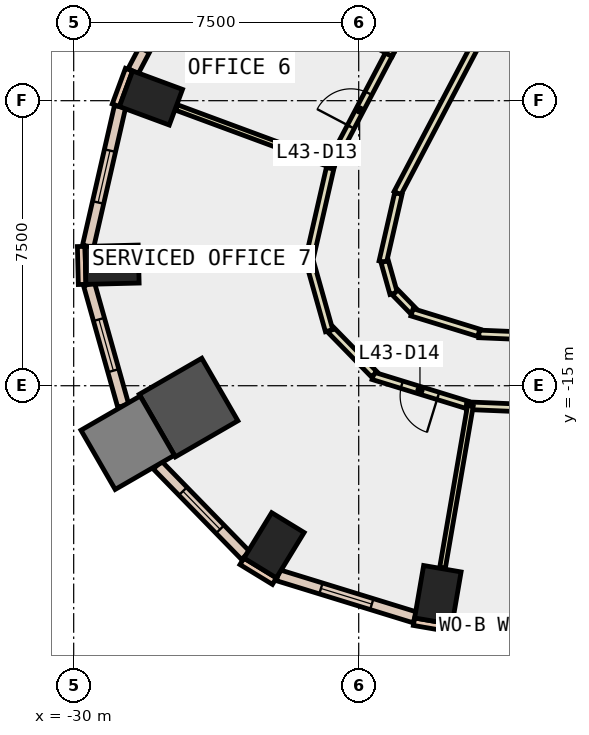
"""IFC4 building model, lengths in metres.
Left out: names, types, materials, properties, quantities, classifications, styles, units other than length and angle.
Written with IfcOpenShell. Run it as: python <this file> out.ifc"""

import sys

from ifc_helpers import new_model, si_unit, direction, frame, frame_2d, origin, origin_2d, place, context, subcontext, project, spatial, rectangle, extrude, element, fill, save


model = new_model("IFC4")
c1 = context("Model", 3, precision=1e-05, world=origin(), true_north=direction((0.0, 1.0)))
c2 = subcontext(c1, "Body", "Model", "MODEL_VIEW")
j1 = project(units=[si_unit("LENGTHUNIT", "METRE"), si_unit("PLANEANGLEUNIT", "RADIAN")], contexts=[c1])
p1 = place(None, origin())
s1 = spatial("IfcSite", under=j1, at=p1, CompositionType="ELEMENT")
p2 = place(p1, origin())
s2 = spatial("IfcBuilding", under=s1, at=p2, CompositionType="ELEMENT")
p3 = place(p2, frame((0.0, 0.0, 194.0)))
s3 = spatial("IfcBuildingStorey", under=s2, at=p3, CompositionType="ELEMENT", Elevation=194.0)
for number, where, z_axis, x_axis in (
    (1, (-20.417, -20.505, -0.4), (0.0, 0.0, 1.0), (-0.986, 0.169, 0.0)),
    (2, (-27.967, -7.429, -0.4), (0.0, 0.0, 1.0), (0.347, 0.938, 0.0)),
    (3, (-28.99, -11.816, -0.4), (0.0, 0.0, 1.0), (-0.025, 1.0, 0.0)),
):
    element("IfcColumn", number, at=place(p3, frame(where, z_axis=z_axis, x_axis=x_axis)), inside=s3, PredefinedType="COLUMN", context=c2, shape_type="SweptSolid", body=[
        extrude(rectangle(XDim=1.0, YDim=1.4, at=origin_2d()), origin(), (0.0, 0.0, 1.0), 4.2),
    ])
p4 = place(p3, frame((-26.977, -15.575, -0.4), z_axis=(0.0, 0.0, 1.0), x_axis=(0.866025403784, 0.5, 0.0)))
e4 = element("IfcColumn", 4, at=p4, inside=s3, PredefinedType="COLUMN", context=c2, shape_type="SweptSolid", body=[
    extrude(rectangle(XDim=1.9, YDim=1.9, at=origin_2d()), origin(), (0.0, 0.0, 1.0), 4.2),
])
p5 = place(p3, frame((-24.728, -19.199, -0.4), z_axis=(0.0, 0.0, 1.0), x_axis=(-0.853423465127, 0.521218178089, 0.0)))
e5 = element("IfcColumn", 5, at=p5, inside=s3, PredefinedType="COLUMN", context=c2, shape_type="SweptSolid", body=[
    extrude(rectangle(XDim=1.0, YDim=1.4, at=origin_2d()), origin(), (0.0, 0.0, 1.0), 4.2),
])
p6 = place(p3, frame((-28.579, -16.5, -0.4), z_axis=(0.0, 0.0, 1.0), x_axis=(0.866025403784, 0.5, 0.0)))
e6 = element("IfcColumn", 6, at=p6, inside=s3, PredefinedType="COLUMN", context=c2, shape_type="SweptSolid", body=[
    extrude(rectangle(XDim=1.8, YDim=1.8, at=origin_2d()), origin(), (0.0, 0.0, 1.0), 4.2),
])
for number, where, z_axis, x_axis in (
    (7, (-28.544, -6.683, 0.0), (0.0, 0.0, 1.0), (-0.347, -0.938, 0.0)),
    (8, (-21.045, -21.209, 0.0), (0.0, 0.0, 1.0), (0.986, -0.169, 0.0)),
):
    element("IfcWall", number, at=place(p3, frame(where, z_axis=z_axis, x_axis=x_axis)), inside=s3, PredefinedType="STANDARD", context=c2, shape_type="SweptSolid", body=[
        extrude(rectangle(XDim=1.0, YDim=0.2, at=frame_2d((0.5, 0.0))), origin(), (0.0, 0.0, 1.0), 3.8),
    ])
p7 = place(p3, frame((-29.802, -11.336, 0.0), z_axis=(0.0, 0.0, 1.0), x_axis=(0.023942303888, -0.999713341956, 0.0)))
e9 = element("IfcWall", 9, at=p7, inside=s3, PredefinedType="STANDARD", context=c2, shape_type="SweptSolid", body=[
    extrude(rectangle(XDim=0.999, YDim=0.2, at=frame_2d((0.5, 0.0))), origin(), (0.0, 0.0, 1.0), 3.8),
])
p8 = place(p3, frame((-25.572, -19.621, 0.0), z_axis=(0.0, 0.0, 1.0), x_axis=(0.853679739553, -0.520798331677, 0.0)))
e10 = element("IfcWall", 10, at=p8, inside=s3, PredefinedType="STANDARD", context=c2, shape_type="SweptSolid", body=[
    extrude(rectangle(XDim=1.0, YDim=0.2, at=frame_2d((0.5, 0.0))), origin(), (0.0, 0.0, 1.0), 3.8),
])
p9 = place(p3, frame((-20.041, -21.264, 0.0), z_axis=(0.0, 0.0, 1.0), x_axis=(0.999127941775, -0.041753514387, 0.0)))
e11 = element("IfcWall", 11, at=p9, inside=s3, PredefinedType="STANDARD", context=c2, shape_type="SweptSolid", body=[
    extrude(rectangle(XDim=5.368, YDim=0.3, at=frame_2d((2.684, 0.0))), origin(), (0.0, 0.0, 1.0), 3.8),
])
p10 = place(p9, frame((0.642, 0.0, 0.9)))
e12 = element("IfcOpeningElement", 12, at=p10, cuts=e11, PredefinedType="OPENING", context=c2, shape_type="SweptSolid", body=[
    extrude(rectangle(XDim=1.4, YDim=2.6, at=frame_2d((0.7, 1.3))), frame((0.0, 0.16, 0.0), z_axis=(0.0, -1.0, 0.0), x_axis=(1.0, 0.0, 0.0)), (0.0, 0.0, 1.0), 0.32),
])
p11 = place(p9, frame((3.326, 0.0, 0.9)))
e13 = element("IfcOpeningElement", 13, at=p11, cuts=e11, PredefinedType="OPENING", context=c2, shape_type="SweptSolid", body=[
    extrude(rectangle(XDim=1.4, YDim=2.6, at=frame_2d((0.7, 1.3))), frame((0.0, 0.16, 0.0), z_axis=(0.0, -1.0, 0.0), x_axis=(1.0, 0.0, 0.0)), (0.0, 0.0, 1.0), 0.32),
])
p12 = place(p3, frame((-25.08, -0.345, 0.0), z_axis=(0.0, 0.0, 1.0), x_axis=(-0.465478369088, -0.885059256723, 0.0)))
e14 = element("IfcWall", 14, at=p12, inside=s3, PredefinedType="STANDARD", context=c2, shape_type="SweptSolid", body=[
    extrude(rectangle(XDim=7.208, YDim=0.3, at=frame_2d((3.604, 0.0))), origin(), (0.0, 0.0, 1.0), 3.8),
])
p13 = place(p12, frame((0.602, 0.0, 0.9)))
e15 = element("IfcOpeningElement", 15, at=p13, cuts=e14, PredefinedType="OPENING", context=c2, shape_type="SweptSolid", body=[
    extrude(rectangle(XDim=2.4, YDim=2.6, at=frame_2d((1.2, 1.3))), frame((0.0, 0.16, 0.0), z_axis=(0.0, -1.0, 0.0), x_axis=(1.0, 0.0, 0.0)), (0.0, 0.0, 1.0), 0.32),
])
p14 = place(p12, frame((4.206, 0.0, 0.9)))
e16 = element("IfcOpeningElement", 16, at=p14, cuts=e14, PredefinedType="OPENING", context=c2, shape_type="SweptSolid", body=[
    extrude(rectangle(XDim=2.4, YDim=2.6, at=frame_2d((1.2, 1.3))), frame((0.0, 0.16, 0.0), z_axis=(0.0, -1.0, 0.0), x_axis=(1.0, 0.0, 0.0)), (0.0, 0.0, 1.0), 0.32),
])
p15 = place(p3, frame((-28.781, -7.66, 0.0), z_axis=(0.0, 0.0, 1.0), x_axis=(-0.223013094864, -0.974815448954, 0.0)))
e17 = element("IfcWall", 17, at=p15, inside=s3, PredefinedType="STANDARD", context=c2, shape_type="SweptSolid", body=[
    extrude(rectangle(XDim=3.767, YDim=0.3, at=frame_2d((1.884, 0.0))), origin(), (0.0, 0.0, 1.0), 3.8),
])
p16 = place(p15, frame((1.183, 0.0, 0.9)))
e18 = element("IfcOpeningElement", 18, at=p16, cuts=e17, PredefinedType="OPENING", context=c2, shape_type="SweptSolid", body=[
    extrude(rectangle(XDim=1.4, YDim=2.6, at=frame_2d((0.7, 1.3))), frame((0.0, 0.16, 0.0), z_axis=(0.0, -1.0, 0.0), x_axis=(1.0, 0.0, 0.0)), (0.0, 0.0, 1.0), 0.32),
])
p17 = place(p3, frame((-29.596, -12.33, 0.0), z_axis=(0.0, 0.0, 1.0), x_axis=(0.270798765166, -0.962635979374, 0.0)))
e19 = element("IfcWall", 19, at=p17, inside=s3, PredefinedType="STANDARD", context=c2, shape_type="SweptSolid", body=[
    extrude(rectangle(XDim=3.323, YDim=0.3, at=frame_2d((1.662, 0.0))), origin(), (0.0, 0.0, 1.0), 3.8),
])
p18 = place(p17, frame((0.962, 0.0, 0.9)))
e20 = element("IfcOpeningElement", 20, at=p18, cuts=e19, PredefinedType="OPENING", context=c2, shape_type="SweptSolid", body=[
    extrude(rectangle(XDim=1.4, YDim=2.6, at=frame_2d((0.7, 1.3))), frame((0.0, 0.16, 0.0), z_axis=(0.0, -1.0, 0.0), x_axis=(1.0, 0.0, 0.0)), (0.0, 0.0, 1.0), 0.32),
])
p19 = place(p3, frame((-27.797, -17.087, 0.0), z_axis=(0.0, 0.0, 1.0), x_axis=(0.698311919602, -0.71579358962, 0.0)))
e21 = element("IfcWall", 21, at=p19, inside=s3, PredefinedType="STANDARD", context=c2, shape_type="SweptSolid", body=[
    extrude(rectangle(XDim=3.324, YDim=0.3, at=frame_2d((1.662, 0.0))), origin(), (0.0, 0.0, 1.0), 3.8),
])
p20 = place(p19, frame((0.962, 0.0, 0.9)))
e22 = element("IfcOpeningElement", 22, at=p20, cuts=e21, PredefinedType="OPENING", context=c2, shape_type="SweptSolid", body=[
    extrude(rectangle(XDim=1.4, YDim=2.6, at=frame_2d((0.7, 1.3))), frame((0.0, 0.16, 0.0), z_axis=(0.0, -1.0, 0.0), x_axis=(1.0, 0.0, 0.0)), (0.0, 0.0, 1.0), 0.32),
])
p21 = place(p3, frame((-24.624, -19.986, 0.0), z_axis=(0.0, 0.0, 1.0), x_axis=(0.955692086233, -0.29436819854, 0.0)))
e23 = element("IfcWall", 23, at=p21, inside=s3, PredefinedType="STANDARD", context=c2, shape_type="SweptSolid", body=[
    extrude(rectangle(XDim=3.767, YDim=0.3, at=frame_2d((1.884, 0.0))), origin(), (0.0, 0.0, 1.0), 3.8),
])
p22 = place(p21, frame((1.183, 0.0, 0.9)))
e24 = element("IfcOpeningElement", 24, at=p22, cuts=e23, PredefinedType="OPENING", context=c2, shape_type="SweptSolid", body=[
    extrude(rectangle(XDim=1.4, YDim=2.6, at=frame_2d((0.7, 1.3))), frame((0.0, 0.16, 0.0), z_axis=(0.0, -1.0, 0.0), x_axis=(1.0, 0.0, 0.0)), (0.0, 0.0, 1.0), 0.32),
])
p23 = place(p3, frame((-18.112, -3.531, 0.0), z_axis=(0.0, 0.0, 1.0), x_axis=(-0.465461327558, -0.885068219149, 0.0)))
e25 = element("IfcWall", 25, at=p23, inside=s3, PredefinedType="PARTITIONING", context=c2, shape_type="SweptSolid", body=[
    extrude(rectangle(XDim=7.236, YDim=0.2, at=frame_2d((3.618, 0.0))), origin(), (0.0, 0.0, 1.0), 3.8),
])
p24 = place(p3, frame((-21.456, -9.944, 0.0), z_axis=(0.0, 0.0, 1.0), x_axis=(-0.222871656966, -0.974847795567, 0.0)))
e26 = element("IfcWall", 26, at=p24, inside=s3, PredefinedType="PARTITIONING", context=c2, shape_type="SweptSolid", body=[
    extrude(rectangle(XDim=1.839, YDim=0.2, at=frame_2d((0.919, 0.0))), origin(), (0.0, 0.0, 1.0), 3.8),
])
p25 = place(p3, frame((-21.816, -11.735, 0.0), z_axis=(0.0, 0.0, 1.0), x_axis=(0.270192443589, -0.962806337447, 0.0)))
e27 = element("IfcWall", 27, at=p25, inside=s3, PredefinedType="PARTITIONING", context=c2, shape_type="SweptSolid", body=[
    extrude(rectangle(XDim=0.869, YDim=0.2, at=frame_2d((0.435, 0.0))), origin(), (0.0, 0.0, 1.0), 3.8),
])
p26 = place(p3, frame((-21.538, -12.547, 0.0), z_axis=(0.0, 0.0, 1.0), x_axis=(0.697542638825, -0.716543276446, 0.0)))
e28 = element("IfcWall", 28, at=p26, inside=s3, PredefinedType="PARTITIONING", context=c2, shape_type="SweptSolid", body=[
    extrude(rectangle(XDim=0.668, YDim=0.2, at=frame_2d((0.334, 0.0))), origin(), (0.0, 0.0, 1.0), 3.8),
])
p27 = place(p3, frame((-21.097, -13.068, 0.0), z_axis=(0.0, 0.0, 1.0), x_axis=(0.955790442908, -0.294048685161, 0.0)))
e29 = element("IfcWall", 29, at=p27, inside=s3, PredefinedType="PARTITIONING", context=c2, shape_type="SweptSolid", body=[
    extrude(rectangle(XDim=1.846, YDim=0.2, at=frame_2d((0.923, 0.0))), origin(), (0.0, 0.0, 1.0), 3.8),
])
p28 = place(p3, frame((-19.336, -13.637, 0.0), z_axis=(0.0, 0.0, 1.0), x_axis=(0.999130261307, -0.041697972867, 0.0)))
e30 = element("IfcWall", 30, at=p28, inside=s3, PredefinedType="PARTITIONING", context=c2, shape_type="SweptSolid", body=[
    extrude(rectangle(XDim=5.422, YDim=0.2, at=frame_2d((2.711, 0.0))), origin(), (0.0, 0.0, 1.0), 3.8),
])
p29 = place(p3, frame((-23.242, -9.204, 0.0), z_axis=(0.0, 0.0, 1.0), x_axis=(0.465431933571, 0.885083676955, 0.0)))
e31 = element("IfcWall", 31, at=p29, inside=s3, PredefinedType="PARTITIONING", context=c2, shape_type="SweptSolid", body=[
    extrude(rectangle(XDim=3.296, YDim=0.2, at=frame_2d((1.648, 0.0))), origin(), (0.0, 0.0, 1.0), 3.8),
])
p30 = place(p29, frame((1.148, 0.0, 0.0)))
e32 = element("IfcOpeningElement", 32, at=p30, cuts=e31, PredefinedType="OPENING", context=c2, shape_type="SweptSolid", body=[
    extrude(rectangle(XDim=1.0, YDim=2.1, at=frame_2d((0.5, 1.05))), frame((0.0, 0.11, 0.0), z_axis=(0.0, -1.0, 0.0), x_axis=(1.0, 0.0, 0.0)), (0.0, 0.0, 1.0), 0.22),
])
p31 = place(p3, frame((-19.657, -15.5, 0.0), z_axis=(0.0, 0.0, 1.0), x_axis=(-0.955612889251, 0.294625195625, 0.0)))
e33 = element("IfcWall", 33, at=p31, inside=s3, PredefinedType="PARTITIONING", context=c2, shape_type="SweptSolid", body=[
    extrude(rectangle(XDim=2.576, YDim=0.2, at=frame_2d((1.288, 0.0))), origin(), (0.0, 0.0, 1.0), 3.8),
])
p32 = place(p31, frame((0.788, 0.0, 0.0)))
e34 = element("IfcOpeningElement", 34, at=p32, cuts=e33, PredefinedType="OPENING", context=c2, shape_type="SweptSolid", body=[
    extrude(rectangle(XDim=1.0, YDim=2.1, at=frame_2d((0.5, 1.05))), frame((0.0, 0.11, 0.0), z_axis=(0.0, -1.0, 0.0), x_axis=(1.0, 0.0, 0.0)), (0.0, 0.0, 1.0), 0.22),
])
p33 = place(p3, frame((-22.093, -14.699, 0.0), z_axis=(0.0, 0.0, 1.0), x_axis=(-0.698551276451, 0.715560000397, 0.0)))
e35 = element("IfcWall", 35, at=p33, inside=s3, PredefinedType="PARTITIONING", context=c2, shape_type="SweptSolid", body=[
    extrude(rectangle(XDim=1.636, YDim=0.2, at=frame_2d((0.818, 0.0))), origin(), (0.0, 0.0, 1.0), 3.8),
])
p34 = place(p3, frame((-23.279, -13.552, 0.0), z_axis=(0.0, 0.0, 1.0), x_axis=(-0.270522287318, 0.962713712411, 0.0)))
e36 = element("IfcWall", 36, at=p34, inside=s3, PredefinedType="PARTITIONING", context=c2, shape_type="SweptSolid", body=[
    extrude(rectangle(XDim=1.836, YDim=0.2, at=frame_2d((0.918, 0.0))), origin(), (0.0, 0.0, 1.0), 3.8),
])
p35 = place(p3, frame((-23.826, -11.785, 0.0), z_axis=(0.0, 0.0, 1.0), x_axis=(0.222909903746, 0.974839050722, 0.0)))
e37 = element("IfcWall", 37, at=p35, inside=s3, PredefinedType="PARTITIONING", context=c2, shape_type="SweptSolid", body=[
    extrude(rectangle(XDim=2.571, YDim=0.2, at=frame_2d((1.285, 0.0))), origin(), (0.0, 0.0, 1.0), 3.8),
])
p36 = place(p3, frame((-13.984, -15.762, 0.0), z_axis=(0.0, 0.0, 1.0), x_axis=(-0.999129271091, 0.041721692781, 0.0)))
e38 = element("IfcWall", 38, at=p36, inside=s3, PredefinedType="PARTITIONING", context=c2, shape_type="SweptSolid", body=[
    extrude(rectangle(XDim=5.682, YDim=0.2, at=frame_2d((2.841, 0.0))), origin(), (0.0, 0.0, 1.0), 3.8),
])
p37 = place(p36, frame((2.341, 0.0, 0.0)))
e39 = element("IfcOpeningElement", 39, at=p37, cuts=e38, PredefinedType="OPENING", context=c2, shape_type="SweptSolid", body=[
    extrude(rectangle(XDim=1.0, YDim=2.1, at=frame_2d((0.5, 1.05))), frame((0.0, 0.11, 0.0), z_axis=(0.0, -1.0, 0.0), x_axis=(1.0, 0.0, 0.0)), (0.0, 0.0, 1.0), 0.22),
])
p38 = place(p3, frame((-21.585, -6.267, 0.0), z_axis=(0.0, 0.0, 1.0), x_axis=(-0.885073333504, 0.465451602554, 0.0)))
e40 = element("IfcWall", 40, at=p38, inside=s3, PredefinedType="PARTITIONING", context=c2, shape_type="SweptSolid", body=[
    extrude(rectangle(XDim=5.7, YDim=0.15, at=frame_2d((2.85, 0.0))), origin(), (0.0, 0.0, 1.0), 3.8),
])
p39 = place(p3, frame((-23.137, -9.217, 0.0), z_axis=(0.0, 0.0, 1.0), x_axis=(-0.937808569806, 0.34715282859, 0.0)))
e41 = element("IfcWall", 41, at=p39, inside=s3, PredefinedType="PARTITIONING", context=c2, shape_type="SweptSolid", body=[
    extrude(rectangle(XDim=4.431, YDim=0.15, at=frame_2d((2.215, 0.0))), origin(), (0.0, 0.0, 1.0), 3.8),
])
p40 = place(p3, frame((-19.561, -15.529, 0.0), z_axis=(0.0, 0.0, 1.0), x_axis=(-0.169546150064, -0.98552224886, 0.0)))
e42 = element("IfcWall", 42, at=p40, inside=s3, PredefinedType="PARTITIONING", context=c2, shape_type="SweptSolid", body=[
    extrude(rectangle(XDim=4.329, YDim=0.15, at=frame_2d((2.164, 0.0))), origin(), (0.0, 0.0, 1.0), 3.8),
])
p41 = place(p10, origin())
e43 = element("IfcWindow", 43, at=p41, inside=s3, PartitioningType="SINGLE_PANEL", PredefinedType="WINDOW", context=c2, shape_type="SweptSolid", body=[
    extrude(rectangle(XDim=1.4, YDim=2.6, at=frame_2d((0.7, 1.3))), frame((0.0, 0.03, 0.0), z_axis=(0.0, -1.0, 0.0), x_axis=(1.0, 0.0, 0.0)), (0.0, 0.0, 1.0), 0.06),
])
fill(e12, e43)
p42 = place(p16, origin())
e44 = element("IfcWindow", 44, at=p42, inside=s3, PartitioningType="SINGLE_PANEL", PredefinedType="WINDOW", context=c2, shape_type="SweptSolid", body=[
    extrude(rectangle(XDim=1.4, YDim=2.6, at=frame_2d((0.7, 1.3))), frame((0.0, 0.03, 0.0), z_axis=(0.0, -1.0, 0.0), x_axis=(1.0, 0.0, 0.0)), (0.0, 0.0, 1.0), 0.06),
])
fill(e18, e44)
p43 = place(p18, origin())
e45 = element("IfcWindow", 45, at=p43, inside=s3, PartitioningType="SINGLE_PANEL", PredefinedType="WINDOW", context=c2, shape_type="SweptSolid", body=[
    extrude(rectangle(XDim=1.4, YDim=2.6, at=frame_2d((0.7, 1.3))), frame((0.0, 0.03, 0.0), z_axis=(0.0, -1.0, 0.0), x_axis=(1.0, 0.0, 0.0)), (0.0, 0.0, 1.0), 0.06),
])
fill(e20, e45)
p44 = place(p20, origin())
e46 = element("IfcWindow", 46, at=p44, inside=s3, PartitioningType="SINGLE_PANEL", PredefinedType="WINDOW", context=c2, shape_type="SweptSolid", body=[
    extrude(rectangle(XDim=1.4, YDim=2.6, at=frame_2d((0.7, 1.3))), frame((0.0, 0.03, 0.0), z_axis=(0.0, -1.0, 0.0), x_axis=(1.0, 0.0, 0.0)), (0.0, 0.0, 1.0), 0.06),
])
fill(e22, e46)
p45 = place(p22, origin())
e47 = element("IfcWindow", 47, at=p45, inside=s3, PartitioningType="SINGLE_PANEL", PredefinedType="WINDOW", context=c2, shape_type="SweptSolid", body=[
    extrude(rectangle(XDim=1.4, YDim=2.6, at=frame_2d((0.7, 1.3))), frame((0.0, 0.03, 0.0), z_axis=(0.0, -1.0, 0.0), x_axis=(1.0, 0.0, 0.0)), (0.0, 0.0, 1.0), 0.06),
])
fill(e24, e47)
p46 = place(p30, origin())
e48 = element("IfcDoor", 48, at=p46, inside=s3, OperationType="SINGLE_SWING_RIGHT", PredefinedType="DOOR", context=c2, shape_type="SweptSolid", body=[
    extrude(rectangle(XDim=1.0, YDim=2.1, at=frame_2d((0.5, 1.05))), frame((0.0, 0.025, 0.0), z_axis=(0.0, -1.0, 0.0), x_axis=(1.0, 0.0, 0.0)), (0.0, 0.0, 1.0), 0.05),
])
fill(e32, e48)
p47 = place(p32, origin())
e49 = element("IfcDoor", 49, at=p47, inside=s3, OperationType="SINGLE_SWING_LEFT", PredefinedType="DOOR", context=c2, shape_type="SweptSolid", body=[
    extrude(rectangle(XDim=1.0, YDim=2.1, at=frame_2d((0.5, 1.05))), frame((0.0, 0.025, 0.0), z_axis=(0.0, -1.0, 0.0), x_axis=(1.0, 0.0, 0.0)), (0.0, 0.0, 1.0), 0.05),
])
fill(e34, e49)
save(model, sys.argv[1])
